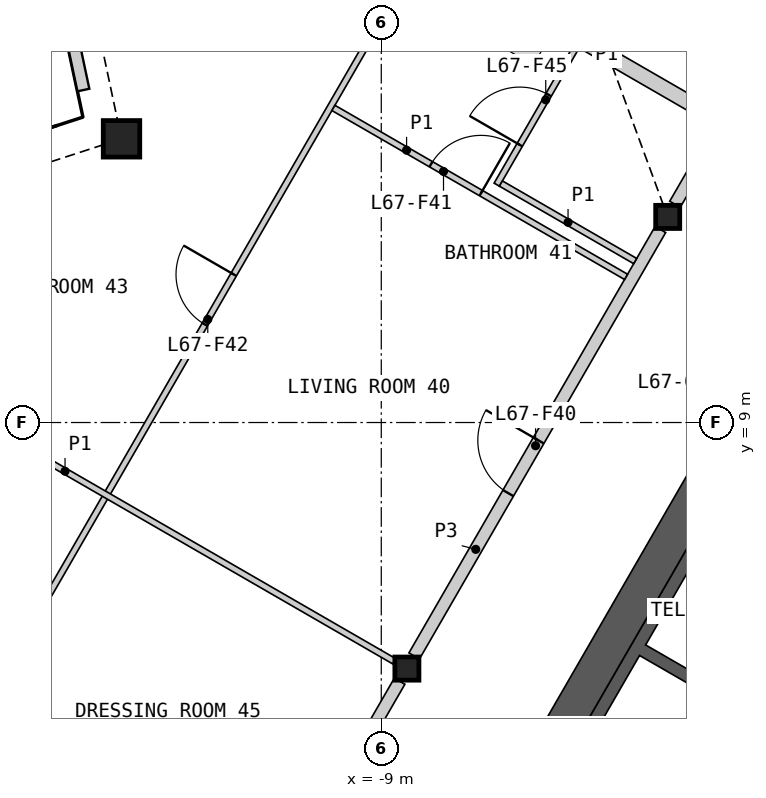
"""IFC4 building model, lengths in metres.
Left out: names, types, materials, properties, quantities, classifications, styles, units other than length and angle.
Written with IfcOpenShell. Run it as: python <this file> out.ifc"""

import sys

from ifc_helpers import new_model, si_unit, direction, frame, frame_2d, origin, origin_2d, place, context, subcontext, project, spatial, polyline, rectangle, hollow_rectangle, i_section, outline, extrude, element, fill, save


model = new_model("IFC4")
c1 = context("Model", 3, precision=1e-05, world=origin(), true_north=direction((0.0, 1.0)))
c2 = subcontext(c1, "Body", "Model", "MODEL_VIEW")
j1 = project(units=[si_unit("LENGTHUNIT", "METRE"), si_unit("PLANEANGLEUNIT", "RADIAN")], contexts=[c1])
p1 = place(None, origin())
s1 = spatial("IfcSite", under=j1, at=p1, CompositionType="ELEMENT")
p2 = place(p1, origin())
s2 = spatial("IfcBuilding", under=s1, at=p2, CompositionType="ELEMENT")
p3 = place(p2, frame((0.0, 0.0, 308.6)))
s3 = spatial("IfcBuildingStorey", under=s2, at=p3, CompositionType="ELEMENT", Elevation=308.6)
p4 = place(p3, frame((-13.272, 13.666, 0.0), z_axis=(0.0, 0.0, 1.0), x_axis=(1.0, 0.0, 0.0)))
e1 = element("IfcColumn", 1, at=p4, inside=s3, PredefinedType="COLUMN", context=c2, shape_type="SweptSolid", body=[
    extrude(hollow_rectangle(XDim=0.6, YDim=0.6, WallThickness=0.04, at=origin_2d()), origin(), (0.0, 0.0, 1.0), 3.4),
])
for number, where, z_axis, x_axis in (
    (2, (-4.289, 12.382, 0.0), (0.0, 0.0, 1.0), (1.0, 0.0, 0.0)),
    (3, (-8.578, 4.953, 0.0), (0.0, 0.0, 1.0), (1.0, 0.0, 0.0)),
):
    element("IfcColumn", number, at=place(p3, frame(where, z_axis=z_axis, x_axis=x_axis)), inside=s3, PredefinedType="COLUMN", context=c2, shape_type="SweptSolid", body=[
        extrude(i_section(OverallWidth=0.396, OverallDepth=0.381, WebThickness=0.019, FlangeThickness=0.03, at=origin_2d()), origin(), (0.0, 0.0, 1.0), 3.4),
    ])
p5 = place(p3, frame((-15.192, 20.553, 0.0), z_axis=(0.0, 0.0, 1.0), x_axis=(0.207920712138, -0.97814568315, 0.0)))
e4 = element("IfcWall", 4, at=p5, inside=s3, PredefinedType="SOLIDWALL", context=c2, shape_type="SweptSolid", body=[
    extrude(rectangle(XDim=6.221, YDim=0.2, at=frame_2d((3.11, 0.0))), origin(), (0.0, 0.0, 1.0), 2.488),
])
p6 = place(p5, frame((2.362, 0.0, 0.0)))
e5 = element("IfcOpeningElement", 5, at=p6, cuts=e4, PredefinedType="OPENING", context=c2, shape_type="SweptSolid", body=[
    extrude(rectangle(XDim=1.6, YDim=2.25, at=frame_2d((0.8, 1.125))), frame((0.0, 0.11, 0.0), z_axis=(0.0, -1.0, 0.0), x_axis=(1.0, 0.0, 0.0)), (0.0, 0.0, 1.0), 0.22),
])
p7 = place(p3, origin())
e6 = element("IfcWall", 6, at=p7, inside=s3, PredefinedType="SHEAR", context=c2, shape_type="SweptSolid", body=[
    extrude(outline(polyline([(-4.96, 0.208), (-7.131, 1.461), (-3.731, 7.35), (-1.561, 6.097), (-1.66, 5.924), (-3.652, 7.074), (-4.652, 5.342), (-2.66, 4.192), (-2.76, 4.019), (-4.752, 5.169), (-6.852, 1.531), (-4.861, 0.381), (-4.96, 0.208)])), origin(), (0.0, 0.0, 1.0), 3.1),
])
p8 = place(p3, frame((-1.631, 5.776, 0.0), z_axis=(0.0, 0.0, 1.0), x_axis=(-0.499992876559, -0.866029516466, 0.0)))
e7 = element("IfcWall", 7, at=p8, inside=s3, PredefinedType="SOLIDWALL", context=c2, shape_type="SweptSolid", body=[
    extrude(rectangle(XDim=6.486, YDim=0.2, at=frame_2d((3.243, 0.0))), origin(), (0.0, 0.0, 1.0), 3.1),
])
p9 = place(p8, frame((0.437, 0.0, 0.0)))
e8 = element("IfcOpeningElement", 8, at=p9, cuts=e7, PredefinedType="OPENING", context=c2, shape_type="SweptSolid", body=[
    extrude(rectangle(XDim=0.9, YDim=2.1, at=frame_2d((0.45, 1.05))), frame((0.0, 0.11, 0.0), z_axis=(0.0, -1.0, 0.0), x_axis=(1.0, 0.0, 0.0)), (0.0, 0.0, 1.0), 0.22),
])
p10 = place(p8, frame((3.737, 0.0, 0.0)))
e9 = element("IfcOpeningElement", 9, at=p10, cuts=e7, PredefinedType="OPENING", context=c2, shape_type="SweptSolid", body=[
    extrude(rectangle(XDim=0.9, YDim=2.1, at=frame_2d((0.45, 1.05))), frame((0.0, 0.11, 0.0), z_axis=(0.0, -1.0, 0.0), x_axis=(1.0, 0.0, 0.0)), (0.0, 0.0, 1.0), 0.22),
])
p11 = place(p3, frame((-3.639, 8.107, 0.0), z_axis=(0.0, 0.0, 1.0), x_axis=(-0.49999180351, -0.866030135978, 0.0)))
e10 = element("IfcWall", 10, at=p11, inside=s3, PredefinedType="SHEAR", context=c2, shape_type="SweptSolid", body=[
    extrude(rectangle(XDim=7.401, YDim=0.6, at=frame_2d((3.701, 0.0))), origin(), (0.0, 0.0, 1.0), 3.1),
])
p12 = place(p3, frame((-8.458, 5.16, 0.0), z_axis=(0.0, 0.0, 1.0), x_axis=(0.499984266882, 0.866034487114, 0.0)))
e11 = element("IfcWall", 11, at=p12, inside=s3, PredefinedType="PARTITIONING", context=c2, shape_type="SweptSolid", body=[
    extrude(rectangle(XDim=8.099, YDim=0.2, at=frame_2d((4.049, 0.0))), origin(), (0.0, 0.0, 1.0), 3.1),
])
p13 = place(p12, frame((3.093, 0.0, 0.0)))
e12 = element("IfcOpeningElement", 12, at=p13, cuts=e11, PredefinedType="OPENING", context=c2, shape_type="SweptSolid", body=[
    extrude(rectangle(XDim=1.0, YDim=2.1, at=frame_2d((0.5, 1.05))), frame((0.0, 0.11, 0.0), z_axis=(0.0, -1.0, 0.0), x_axis=(1.0, 0.0, 0.0)), (0.0, 0.0, 1.0), 0.22),
])
p14 = place(p3, frame((-12.748, -2.269, 0.0), z_axis=(0.0, 0.0, 1.0), x_axis=(0.499984266882, 0.866034487114, 0.0)))
e13 = element("IfcWall", 13, at=p14, inside=s3, PredefinedType="PARTITIONING", context=c2, shape_type="SweptSolid", body=[
    extrude(rectangle(XDim=8.099, YDim=0.2, at=frame_2d((4.049, 0.0))), origin(), (0.0, 0.0, 1.0), 3.1),
])
p15 = place(p14, frame((1.164, 0.0, 0.0)))
e14 = element("IfcOpeningElement", 14, at=p15, cuts=e13, PredefinedType="OPENING", context=c2, shape_type="SweptSolid", body=[
    extrude(rectangle(XDim=1.0, YDim=2.1, at=frame_2d((0.5, 1.05))), frame((0.0, 0.11, 0.0), z_axis=(0.0, -1.0, 0.0), x_axis=(1.0, 0.0, 0.0)), (0.0, 0.0, 1.0), 0.22),
])
p16 = place(p3, frame((-8.259, 16.756, 0.0), z_axis=(0.0, 0.0, 1.0), x_axis=(0.866023692682, -0.500002963705, 0.0)))
e15 = element("IfcWall", 15, at=p16, inside=s3, PredefinedType="PARTITIONING", context=c2, shape_type="SweptSolid", body=[
    extrude(rectangle(XDim=5.525, YDim=0.25, at=frame_2d((2.762, 0.0))), origin(), (0.0, 0.0, 1.0), 2.33),
])
p17 = place(p3, frame((-4.169, 12.59, 0.0), z_axis=(0.0, 0.0, 1.0), x_axis=(0.499950370306, 0.866054055606, 0.0)))
e16 = element("IfcWall", 16, at=p17, inside=s3, PredefinedType="PARTITIONING", context=c2, shape_type="SweptSolid", body=[
    extrude(rectangle(XDim=4.513, YDim=0.2, at=frame_2d((2.256, 0.0))), origin(), (0.0, 0.0, 1.0), 3.1),
])
p18 = place(p17, frame((2.459, 0.0, 0.0)))
e17 = element("IfcOpeningElement", 17, at=p18, cuts=e16, PredefinedType="OPENING", context=c2, shape_type="SweptSolid", body=[
    extrude(rectangle(XDim=1.0, YDim=2.1, at=frame_2d((0.5, 1.05))), frame((0.0, 0.11, 0.0), z_axis=(0.0, -1.0, 0.0), x_axis=(1.0, 0.0, 0.0)), (0.0, 0.0, 1.0), 0.22),
])
p19 = place(p3, frame((-16.054, 3.419, 0.0), z_axis=(0.0, 0.0, 1.0), x_axis=(0.499999256795, 0.866025832873, 0.0)))
e18 = element("IfcWall", 18, at=p19, inside=s3, PredefinedType="PARTITIONING", context=c2, shape_type="SweptSolid", body=[
    extrude(rectangle(XDim=15.448, YDim=0.1, at=frame_2d((7.724, 0.0))), origin(), (0.0, 0.0, 1.0), 2.33),
])
p20 = place(p19, frame((8.306, 0.0, 0.0)))
e19 = element("IfcOpeningElement", 19, at=p20, cuts=e18, PredefinedType="OPENING", context=c2, shape_type="SweptSolid", body=[
    extrude(rectangle(XDim=0.95, YDim=2.1, at=frame_2d((0.475, 1.05))), frame((0.0, 0.06, 0.0), z_axis=(0.0, -1.0, 0.0), x_axis=(1.0, 0.0, 0.0)), (0.0, 0.0, 1.0), 0.12),
])
p21 = place(p19, frame((1.76, 0.0, 0.0)))
e20 = element("IfcOpeningElement", 20, at=p21, cuts=e18, PredefinedType="OPENING", context=c2, shape_type="SweptSolid", body=[
    extrude(rectangle(XDim=0.95, YDim=2.1, at=frame_2d((0.475, 1.05))), frame((0.0, 0.06, 0.0), z_axis=(0.0, -1.0, 0.0), x_axis=(1.0, 0.0, 0.0)), (0.0, 0.0, 1.0), 0.12),
])
p22 = place(p3, frame((-19.615, 11.325, 0.0), z_axis=(0.0, 0.0, 1.0), x_axis=(0.86602139559, -0.500006942333, 0.0)))
e21 = element("IfcWall", 21, at=p22, inside=s3, PredefinedType="PARTITIONING", context=c2, shape_type="SweptSolid", body=[
    extrude(rectangle(XDim=12.505, YDim=0.1, at=frame_2d((6.252, 0.0))), origin(), (0.0, 0.0, 1.0), 2.33),
])
p23 = place(p22, frame((4.37, 0.0, 0.0)))
e22 = element("IfcOpeningElement", 22, at=p23, cuts=e21, PredefinedType="OPENING", context=c2, shape_type="SweptSolid", body=[
    extrude(rectangle(XDim=0.95, YDim=2.1, at=frame_2d((0.475, 1.05))), frame((0.0, 0.06, 0.0), z_axis=(0.0, -1.0, 0.0), x_axis=(1.0, 0.0, 0.0)), (0.0, 0.0, 1.0), 0.12),
])
p24 = place(p3, frame((-9.787, 14.174, 0.0), z_axis=(0.0, 0.0, 1.0), x_axis=(0.866031222068, -0.499989922303, 0.0)))
e23 = element("IfcWall", 23, at=p24, inside=s3, PredefinedType="PARTITIONING", context=c2, shape_type="SweptSolid", body=[
    extrude(rectangle(XDim=5.557, YDim=0.1, at=frame_2d((2.779, 0.0))), origin(), (0.0, 0.0, 1.0), 2.33),
])
p25 = place(p24, frame((1.853, 0.0, 0.0)))
e24 = element("IfcOpeningElement", 24, at=p25, cuts=e23, PredefinedType="OPENING", context=c2, shape_type="SweptSolid", body=[
    extrude(rectangle(XDim=0.95, YDim=2.1, at=frame_2d((0.475, 1.05))), frame((0.0, 0.06, 0.0), z_axis=(0.0, -1.0, 0.0), x_axis=(1.0, 0.0, 0.0)), (0.0, 0.0, 1.0), 0.12),
])
p26 = place(p3, frame((-7.101, 12.912, 0.0), z_axis=(0.0, 0.0, 1.0), x_axis=(0.499996545922, 0.866027397988, 0.0)))
e25 = element("IfcWall", 25, at=p26, inside=s3, PredefinedType="PARTITIONING", context=c2, shape_type="SweptSolid", body=[
    extrude(rectangle(XDim=5.5, YDim=0.1, at=frame_2d((2.75, 0.0))), origin(), (0.0, 0.0, 1.0), 2.33),
])
p27 = place(p26, frame((0.756, 0.0, 0.0)))
e26 = element("IfcOpeningElement", 26, at=p27, cuts=e25, PredefinedType="OPENING", context=c2, shape_type="SweptSolid", body=[
    extrude(rectangle(XDim=0.95, YDim=2.1, at=frame_2d((0.475, 1.05))), frame((0.0, 0.06, 0.0), z_axis=(0.0, -1.0, 0.0), x_axis=(1.0, 0.0, 0.0)), (0.0, 0.0, 1.0), 0.12),
])
p28 = place(p3, frame((-7.032, 12.93, 0.0), z_axis=(0.0, 0.0, 1.0), x_axis=(0.866030925526, -0.499990435942, 0.0)))
e27 = element("IfcWall", 27, at=p28, inside=s3, PredefinedType="PARTITIONING", context=c2, shape_type="SweptSolid", body=[
    extrude(rectangle(XDim=2.55, YDim=0.1, at=frame_2d((1.275, 0.0))), origin(), (0.0, 0.0, 1.0), 2.33),
])
p29 = place(p13, origin())
e28 = element("IfcDoor", 28, at=p29, inside=s3, OperationType="SINGLE_SWING_RIGHT", PredefinedType="DOOR", context=c2, shape_type="SweptSolid", body=[
    extrude(rectangle(XDim=1.0, YDim=2.1, at=frame_2d((0.5, 1.05))), frame((0.0, 0.025, 0.0), z_axis=(0.0, -1.0, 0.0), x_axis=(1.0, 0.0, 0.0)), (0.0, 0.0, 1.0), 0.05),
])
fill(e12, e28)
p30 = place(p25, origin())
e29 = element("IfcDoor", 29, at=p30, inside=s3, OperationType="SINGLE_SWING_RIGHT", PredefinedType="DOOR", context=c2, shape_type="SweptSolid", body=[
    extrude(rectangle(XDim=0.95, YDim=2.1, at=frame_2d((0.475, 1.05))), frame((0.0, 0.025, 0.0), z_axis=(0.0, -1.0, 0.0), x_axis=(1.0, 0.0, 0.0)), (0.0, 0.0, 1.0), 0.05),
])
fill(e24, e29)
p31 = place(p20, origin())
e30 = element("IfcDoor", 30, at=p31, inside=s3, OperationType="SINGLE_SWING_RIGHT", PredefinedType="DOOR", context=c2, shape_type="SweptSolid", body=[
    extrude(rectangle(XDim=0.95, YDim=2.1, at=frame_2d((0.475, 1.05))), frame((0.0, 0.025, 0.0), z_axis=(0.0, -1.0, 0.0), x_axis=(1.0, 0.0, 0.0)), (0.0, 0.0, 1.0), 0.05),
])
fill(e19, e30)
p32 = place(p27, origin())
e31 = element("IfcDoor", 31, at=p32, inside=s3, OperationType="SINGLE_SWING_LEFT", PredefinedType="DOOR", context=c2, shape_type="SweptSolid", body=[
    extrude(rectangle(XDim=0.95, YDim=2.1, at=frame_2d((0.475, 1.05))), frame((0.0, 0.025, 0.0), z_axis=(0.0, -1.0, 0.0), x_axis=(1.0, 0.0, 0.0)), (0.0, 0.0, 1.0), 0.05),
])
fill(e26, e31)
save(model, sys.argv[1])
